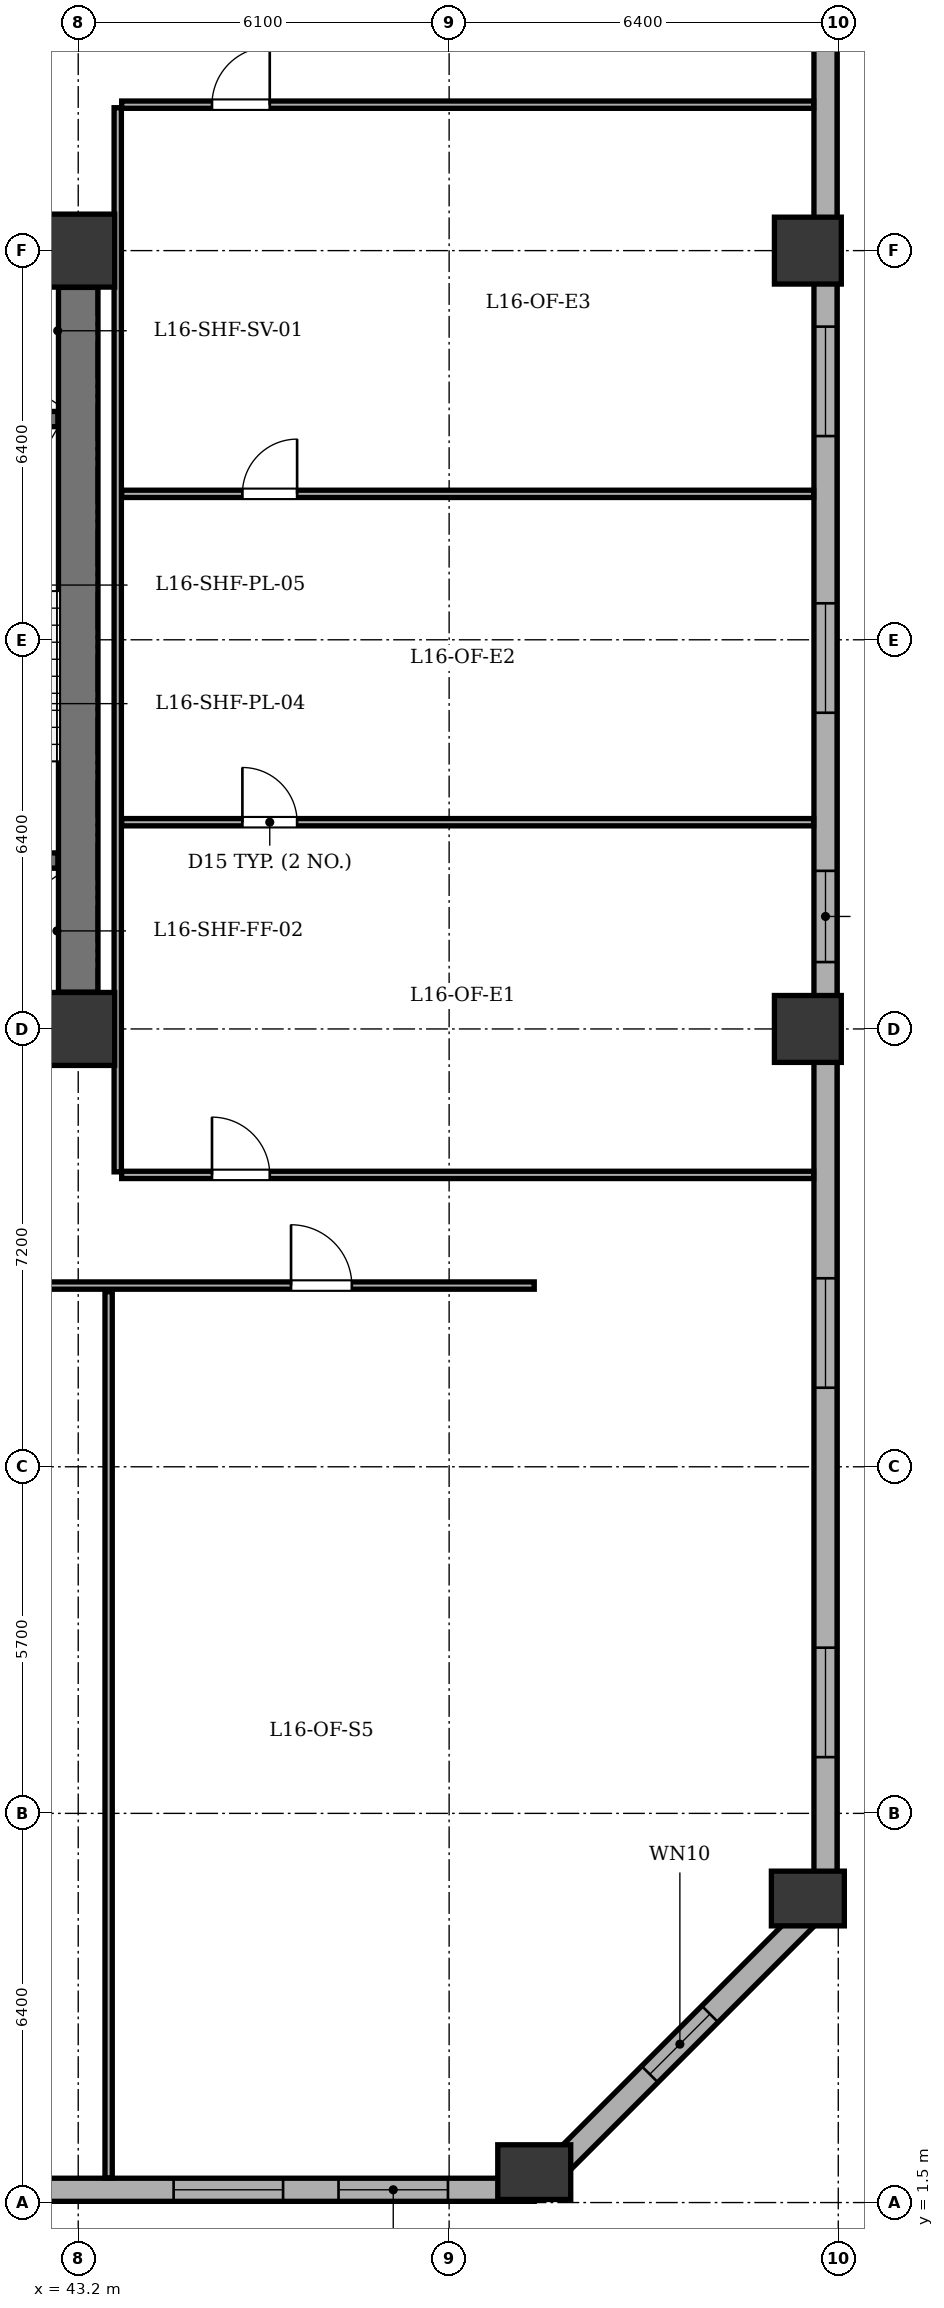
"""IFC4 building model, lengths in metres.
Left out: names, types, materials, properties, quantities, classifications, styles, units other than length and angle.
Written with IfcOpenShell. Run it as: python <this file> out.ifc"""

import sys

from ifc_helpers import new_model, si_unit, direction, frame, frame_2d, origin, origin_2d, place, context, subcontext, project, spatial, rectangle, extrude, element, fill, save


model = new_model("IFC4")
c1 = context("Model", 3, precision=1e-05, world=origin(), true_north=direction((0.0, 1.0)))
c2 = subcontext(c1, "Body", "Model", "MODEL_VIEW")
j1 = project(units=[si_unit("LENGTHUNIT", "METRE"), si_unit("PLANEANGLEUNIT", "RADIAN")], contexts=[c1])
p1 = place(None, origin())
s1 = spatial("IfcSite", under=j1, at=p1, CompositionType="ELEMENT")
p2 = place(p1, origin())
s2 = spatial("IfcBuilding", under=s1, at=p2, CompositionType="ELEMENT")
p3 = place(p2, frame((0.0, 0.0, 67.2)))
s3 = spatial("IfcBuildingStorey", under=s2, at=p3, CompositionType="ELEMENT", Elevation=67.2)
for number, where, z_axis, x_axis in (
    (1, (43.2, 20.8, 0.0), (0.0, 0.0, 1.0), (1.0, 0.0, 0.0)),
    (2, (43.2, 33.6, 0.0), (0.0, 0.0, 1.0), (1.0, 0.0, 0.0)),
):
    element("IfcColumn", number, at=place(p3, frame(where, z_axis=z_axis, x_axis=x_axis)), inside=s3, PredefinedType="COLUMN", context=c2, shape_type="SweptSolid", body=[
        extrude(rectangle(XDim=1.2, YDim=1.2, at=origin_2d()), origin(), (0.0, 0.0, 1.0), 3.9),
    ])
for number, where, z_axis, x_axis in (
    (3, (50.7, 2.0, 0.0), (0.0, 0.0, 1.0), (1.0, 0.0, 0.0)),
    (4, (55.2, 6.5, 0.0), (0.0, 0.0, 1.0), (1.0, 0.0, 0.0)),
):
    element("IfcColumn", number, at=place(p3, frame(where, z_axis=z_axis, x_axis=x_axis)), inside=s3, PredefinedType="COLUMN", context=c2, shape_type="SweptSolid", body=[
        extrude(rectangle(XDim=0.9, YDim=1.2, at=origin_2d()), origin(), (0.0, 0.0, 1.0), 3.9),
    ])
for number, where, z_axis, x_axis in (
    (5, (55.2, 20.8, 0.0), (0.0, 0.0, 1.0), (1.0, 0.0, 0.0)),
    (6, (55.2, 33.6, 0.0), (0.0, 0.0, 1.0), (1.0, 0.0, 0.0)),
):
    element("IfcColumn", number, at=place(p3, frame(where, z_axis=z_axis, x_axis=x_axis)), inside=s3, PredefinedType="COLUMN", context=c2, shape_type="SweptSolid", body=[
        extrude(rectangle(XDim=1.1, YDim=1.1, at=origin_2d()), origin(), (0.0, 0.0, 1.0), 3.9),
    ])
p4 = place(p3, frame((50.7, 1.71, 0.0), z_axis=(0.0, 0.0, 1.0), x_axis=(-1.0, 0.0, 0.0)))
e7 = element("IfcWall", 7, at=p4, inside=s3, PredefinedType="STANDARD", context=c2, shape_type="SweptSolid", body=[
    extrude(rectangle(XDim=35.0, YDim=0.38, at=frame_2d((17.5, 0.0))), origin(), (0.0, 0.0, 1.0), 2.835),
])
p5 = place(p4, frame((26.0, 0.0, 0.0)))
e8 = element("IfcOpeningElement", 8, at=p5, cuts=e7, PredefinedType="OPENING", context=c2, shape_type="SweptSolid", body=[
    extrude(rectangle(XDim=1.0, YDim=2.02, at=frame_2d((0.5, 1.01))), frame((0.0, 0.2, 0.0), z_axis=(0.0, -1.0, 0.0), x_axis=(1.0, 0.0, 0.0)), (0.0, 0.0, 1.0), 0.4),
])
p6 = place(p4, frame((1.419, 0.0, 0.8)))
e9 = element("IfcOpeningElement", 9, at=p6, cuts=e7, PredefinedType="OPENING", context=c2, shape_type="SweptSolid", body=[
    extrude(rectangle(XDim=1.8, YDim=1.9, at=frame_2d((0.9, 0.95))), frame((0.0, 0.2, 0.0), z_axis=(0.0, -1.0, 0.0), x_axis=(1.0, 0.0, 0.0)), (0.0, 0.0, 1.0), 0.4),
])
p7 = place(p4, frame((4.131, 0.0, 0.8)))
e10 = element("IfcOpeningElement", 10, at=p7, cuts=e7, PredefinedType="OPENING", context=c2, shape_type="SweptSolid", body=[
    extrude(rectangle(XDim=1.8, YDim=1.9, at=frame_2d((0.9, 0.95))), frame((0.0, 0.2, 0.0), z_axis=(0.0, -1.0, 0.0), x_axis=(1.0, 0.0, 0.0)), (0.0, 0.0, 1.0), 0.4),
])
p8 = place(p4, frame((8.16, 0.0, 0.8)))
e11 = element("IfcOpeningElement", 11, at=p8, cuts=e7, PredefinedType="OPENING", context=c2, shape_type="SweptSolid", body=[
    extrude(rectangle(XDim=1.8, YDim=1.9, at=frame_2d((0.9, 0.95))), frame((0.0, 0.2, 0.0), z_axis=(0.0, -1.0, 0.0), x_axis=(1.0, 0.0, 0.0)), (0.0, 0.0, 1.0), 0.4),
])
p9 = place(p4, frame((11.04, 0.0, 0.8)))
e12 = element("IfcOpeningElement", 12, at=p9, cuts=e7, PredefinedType="OPENING", context=c2, shape_type="SweptSolid", body=[
    extrude(rectangle(XDim=1.8, YDim=1.9, at=frame_2d((0.9, 0.95))), frame((0.0, 0.2, 0.0), z_axis=(0.0, -1.0, 0.0), x_axis=(1.0, 0.0, 0.0)), (0.0, 0.0, 1.0), 0.4),
])
p10 = place(p4, frame((17.675, 0.0, 0.8)))
e13 = element("IfcOpeningElement", 13, at=p10, cuts=e7, PredefinedType="OPENING", context=c2, shape_type="SweptSolid", body=[
    extrude(rectangle(XDim=1.8, YDim=1.9, at=frame_2d((0.9, 0.95))), frame((0.0, 0.2, 0.0), z_axis=(0.0, -1.0, 0.0), x_axis=(1.0, 0.0, 0.0)), (0.0, 0.0, 1.0), 0.4),
])
p11 = place(p4, frame((31.525, 0.0, 0.8)))
e14 = element("IfcOpeningElement", 14, at=p11, cuts=e7, PredefinedType="OPENING", context=c2, shape_type="SweptSolid", body=[
    extrude(rectangle(XDim=1.8, YDim=1.9, at=frame_2d((0.9, 0.95))), frame((0.0, 0.2, 0.0), z_axis=(0.0, -1.0, 0.0), x_axis=(1.0, 0.0, 0.0)), (0.0, 0.0, 1.0), 0.4),
])
p12 = place(p3, frame((55.49, 41.5, 0.0), z_axis=(0.0, 0.0, 1.0), x_axis=(0.0, -1.0, 0.0)))
e15 = element("IfcWall", 15, at=p12, inside=s3, PredefinedType="STANDARD", context=c2, shape_type="SweptSolid", body=[
    extrude(rectangle(XDim=35.0, YDim=0.38, at=frame_2d((17.5, 0.0))), origin(), (0.0, 0.0, 1.0), 2.835),
])
p13 = place(p12, frame((2.025, 0.0, 0.8)))
e16 = element("IfcOpeningElement", 16, at=p13, cuts=e15, PredefinedType="OPENING", context=c2, shape_type="SweptSolid", body=[
    extrude(rectangle(XDim=1.8, YDim=1.9, at=frame_2d((0.9, 0.95))), frame((0.0, 0.2, 0.0), z_axis=(0.0, -1.0, 0.0), x_axis=(1.0, 0.0, 0.0)), (0.0, 0.0, 1.0), 0.4),
])
p14 = place(p12, frame((9.15, 0.0, 0.8)))
e17 = element("IfcOpeningElement", 17, at=p14, cuts=e15, PredefinedType="OPENING", context=c2, shape_type="SweptSolid", body=[
    extrude(rectangle(XDim=1.8, YDim=1.9, at=frame_2d((0.9, 0.95))), frame((0.0, 0.2, 0.0), z_axis=(0.0, -1.0, 0.0), x_axis=(1.0, 0.0, 0.0)), (0.0, 0.0, 1.0), 0.4),
])
p15 = place(p12, frame((13.7, 0.0, 0.8)))
e18 = element("IfcOpeningElement", 18, at=p15, cuts=e15, PredefinedType="OPENING", context=c2, shape_type="SweptSolid", body=[
    extrude(rectangle(XDim=1.8, YDim=1.9, at=frame_2d((0.9, 0.95))), frame((0.0, 0.2, 0.0), z_axis=(0.0, -1.0, 0.0), x_axis=(1.0, 0.0, 0.0)), (0.0, 0.0, 1.0), 0.4),
])
p16 = place(p12, frame((18.1, 0.0, 0.8)))
e19 = element("IfcOpeningElement", 19, at=p16, cuts=e15, PredefinedType="OPENING", context=c2, shape_type="SweptSolid", body=[
    extrude(rectangle(XDim=1.5, YDim=1.9, at=frame_2d((0.75, 0.95))), frame((0.0, 0.2, 0.0), z_axis=(0.0, -1.0, 0.0), x_axis=(1.0, 0.0, 0.0)), (0.0, 0.0, 1.0), 0.4),
])
p17 = place(p12, frame((24.8, 0.0, 0.8)))
e20 = element("IfcOpeningElement", 20, at=p17, cuts=e15, PredefinedType="OPENING", context=c2, shape_type="SweptSolid", body=[
    extrude(rectangle(XDim=1.8, YDim=1.9, at=frame_2d((0.9, 0.95))), frame((0.0, 0.2, 0.0), z_axis=(0.0, -1.0, 0.0), x_axis=(1.0, 0.0, 0.0)), (0.0, 0.0, 1.0), 0.4),
])
p18 = place(p12, frame((30.875, 0.0, 0.8)))
e21 = element("IfcOpeningElement", 21, at=p18, cuts=e15, PredefinedType="OPENING", context=c2, shape_type="SweptSolid", body=[
    extrude(rectangle(XDim=1.8, YDim=1.9, at=frame_2d((0.9, 0.95))), frame((0.0, 0.2, 0.0), z_axis=(0.0, -1.0, 0.0), x_axis=(1.0, 0.0, 0.0)), (0.0, 0.0, 1.0), 0.4),
])
p19 = place(p3, frame((55.49, 6.5, 0.0), z_axis=(0.0, 0.0, 1.0), x_axis=(-0.707106781187, -0.707106781187, 0.0)))
e22 = element("IfcWall", 22, at=p19, inside=s3, PredefinedType="STANDARD", context=c2, shape_type="SweptSolid", body=[
    extrude(rectangle(XDim=6.774, YDim=0.38, at=frame_2d((3.387, 0.0))), origin(), (0.0, 0.0, 1.0), 2.835),
])
p20 = place(p19, frame((2.687, 0.0, 0.8)))
e23 = element("IfcOpeningElement", 23, at=p20, cuts=e22, PredefinedType="OPENING", context=c2, shape_type="SweptSolid", body=[
    extrude(rectangle(XDim=1.4, YDim=1.65, at=frame_2d((0.7, 0.825))), frame((0.0, 0.2, 0.0), z_axis=(0.0, -1.0, 0.0), x_axis=(1.0, 0.0, 0.0)), (0.0, 0.0, 1.0), 0.4),
])
p21 = place(p3, frame((43.2, 21.405, 0.0), z_axis=(0.0, 0.0, 1.0), x_axis=(0.0, 1.0, 0.0)))
e24 = element("IfcWall", 24, at=p21, inside=s3, PredefinedType="SHEAR", context=c2, shape_type="SweptSolid", body=[
    extrude(rectangle(XDim=11.59, YDim=0.65, at=frame_2d((5.795, 0.0))), origin(), (0.0, 0.0, 1.0), 3.45),
])
for number, where, z_axis, x_axis in (
    (25, (39.69, 23.57, 0.0), (0.0, 0.0, 1.0), (1.0, 0.0, 0.0)),
    (26, (39.69, 30.83, 0.0), (0.0, 0.0, 1.0), (1.0, 0.0, 0.0)),
):
    element("IfcWall", number, at=place(p3, frame(where, z_axis=z_axis, x_axis=x_axis)), inside=s3, PredefinedType="SHEAR", context=c2, shape_type="SweptSolid", body=[
        extrude(rectangle(XDim=3.175, YDim=0.25, at=frame_2d((1.587, 0.0))), origin(), (0.0, 0.0, 1.0), 3.45),
    ])
p22 = place(p3, frame((15.7, 16.58, 0.0), z_axis=(0.0, 0.0, 1.0), x_axis=(1.0, 0.0, 0.0)))
e27 = element("IfcWall", 27, at=p22, inside=s3, PredefinedType="PARTITIONING", context=c2, shape_type="SweptSolid", body=[
    extrude(rectangle(XDim=35.0, YDim=0.12, at=frame_2d((17.5, 0.0))), origin(), (0.0, 0.0, 1.0), 3.45),
])
p23 = place(p22, frame((2.825, 0.0, 0.0)))
e28 = element("IfcOpeningElement", 28, at=p23, cuts=e27, PredefinedType="OPENING", context=c2, shape_type="SweptSolid", body=[
    extrude(rectangle(XDim=1.0, YDim=2.1, at=frame_2d((0.5, 1.05))), frame((0.0, 0.07, 0.0), z_axis=(0.0, -1.0, 0.0), x_axis=(1.0, 0.0, 0.0)), (0.0, 0.0, 1.0), 0.14),
])
p24 = place(p22, frame((9.65, 0.0, 0.0)))
e29 = element("IfcOpeningElement", 29, at=p24, cuts=e27, PredefinedType="OPENING", context=c2, shape_type="SweptSolid", body=[
    extrude(rectangle(XDim=1.0, YDim=2.1, at=frame_2d((0.5, 1.05))), frame((0.0, 0.07, 0.0), z_axis=(0.0, -1.0, 0.0), x_axis=(1.0, 0.0, 0.0)), (0.0, 0.0, 1.0), 0.14),
])
p25 = place(p22, frame((16.825, 0.0, 0.0)))
e30 = element("IfcOpeningElement", 30, at=p25, cuts=e27, PredefinedType="OPENING", context=c2, shape_type="SweptSolid", body=[
    extrude(rectangle(XDim=1.0, YDim=2.1, at=frame_2d((0.5, 1.05))), frame((0.0, 0.07, 0.0), z_axis=(0.0, -1.0, 0.0), x_axis=(1.0, 0.0, 0.0)), (0.0, 0.0, 1.0), 0.14),
])
p26 = place(p22, frame((24.0, 0.0, 0.0)))
e31 = element("IfcOpeningElement", 31, at=p26, cuts=e27, PredefinedType="OPENING", context=c2, shape_type="SweptSolid", body=[
    extrude(rectangle(XDim=1.0, YDim=2.1, at=frame_2d((0.5, 1.05))), frame((0.0, 0.07, 0.0), z_axis=(0.0, -1.0, 0.0), x_axis=(1.0, 0.0, 0.0)), (0.0, 0.0, 1.0), 0.14),
])
p27 = place(p22, frame((31.0, 0.0, 0.0)))
e32 = element("IfcOpeningElement", 32, at=p27, cuts=e27, PredefinedType="OPENING", context=c2, shape_type="SweptSolid", body=[
    extrude(rectangle(XDim=1.0, YDim=2.1, at=frame_2d((0.5, 1.05))), frame((0.0, 0.07, 0.0), z_axis=(0.0, -1.0, 0.0), x_axis=(1.0, 0.0, 0.0)), (0.0, 0.0, 1.0), 0.14),
])
p28 = place(p3, frame((43.7, 1.905, 0.0), z_axis=(0.0, 0.0, 1.0), x_axis=(0.0, 1.0, 0.0)))
e33 = element("IfcWall", 33, at=p28, inside=s3, PredefinedType="PARTITIONING", context=c2, shape_type="SweptSolid", body=[
    extrude(rectangle(XDim=14.575, YDim=0.12, at=frame_2d((7.288, 0.0))), origin(), (0.0, 0.0, 1.0), 3.45),
])
p29 = place(p3, frame((43.85, 18.45, 0.0), z_axis=(0.0, 0.0, 1.0), x_axis=(0.0, 1.0, 0.0)))
e34 = element("IfcWall", 34, at=p29, inside=s3, PredefinedType="PARTITIONING", context=c2, shape_type="SweptSolid", body=[
    extrude(rectangle(XDim=17.5, YDim=0.12, at=frame_2d((8.75, 0.0))), origin(), (0.0, 0.0, 1.0), 3.45),
])
p30 = place(p3, frame((43.915, 18.4, 0.0), z_axis=(0.0, 0.0, 1.0), x_axis=(1.0, 0.0, 0.0)))
e35 = element("IfcWall", 35, at=p30, inside=s3, PredefinedType="PARTITIONING", context=c2, shape_type="SweptSolid", body=[
    extrude(rectangle(XDim=11.38, YDim=0.12, at=frame_2d((5.69, 0.0))), origin(), (0.0, 0.0, 1.0), 3.45),
])
p31 = place(p30, frame((1.485, 0.0, 0.0)))
e36 = element("IfcOpeningElement", 36, at=p31, cuts=e35, PredefinedType="OPENING", context=c2, shape_type="SweptSolid", body=[
    extrude(rectangle(XDim=0.95, YDim=2.1, at=frame_2d((0.475, 1.05))), frame((0.0, 0.07, 0.0), z_axis=(0.0, -1.0, 0.0), x_axis=(1.0, 0.0, 0.0)), (0.0, 0.0, 1.0), 0.14),
])
p32 = place(p3, frame((43.915, 36.0, 0.0), z_axis=(0.0, 0.0, 1.0), x_axis=(1.0, 0.0, 0.0)))
e37 = element("IfcWall", 37, at=p32, inside=s3, PredefinedType="PARTITIONING", context=c2, shape_type="SweptSolid", body=[
    extrude(rectangle(XDim=11.38, YDim=0.12, at=frame_2d((5.69, 0.0))), origin(), (0.0, 0.0, 1.0), 3.45),
])
p33 = place(p32, frame((1.485, 0.0, 0.0)))
e38 = element("IfcOpeningElement", 38, at=p33, cuts=e37, PredefinedType="OPENING", context=c2, shape_type="SweptSolid", body=[
    extrude(rectangle(XDim=0.95, YDim=2.1, at=frame_2d((0.475, 1.05))), frame((0.0, 0.07, 0.0), z_axis=(0.0, -1.0, 0.0), x_axis=(1.0, 0.0, 0.0)), (0.0, 0.0, 1.0), 0.14),
])
p34 = place(p3, frame((43.915, 24.2, 0.0), z_axis=(0.0, 0.0, 1.0), x_axis=(1.0, 0.0, 0.0)))
e39 = element("IfcWall", 39, at=p34, inside=s3, PredefinedType="PARTITIONING", context=c2, shape_type="SweptSolid", body=[
    extrude(rectangle(XDim=11.38, YDim=0.12, at=frame_2d((5.69, 0.0))), origin(), (0.0, 0.0, 1.0), 3.45),
])
p35 = place(p34, frame((1.985, 0.0, 0.0)))
e40 = element("IfcOpeningElement", 40, at=p35, cuts=e39, PredefinedType="OPENING", context=c2, shape_type="SweptSolid", body=[
    extrude(rectangle(XDim=0.9, YDim=2.05, at=frame_2d((0.45, 1.025))), frame((0.0, 0.07, 0.0), z_axis=(0.0, -1.0, 0.0), x_axis=(1.0, 0.0, 0.0)), (0.0, 0.0, 1.0), 0.14),
])
p36 = place(p3, frame((43.915, 29.6, 0.0), z_axis=(0.0, 0.0, 1.0), x_axis=(1.0, 0.0, 0.0)))
e41 = element("IfcWall", 41, at=p36, inside=s3, PredefinedType="PARTITIONING", context=c2, shape_type="SweptSolid", body=[
    extrude(rectangle(XDim=11.38, YDim=0.12, at=frame_2d((5.69, 0.0))), origin(), (0.0, 0.0, 1.0), 2.885),
])
p37 = place(p36, frame((1.985, 0.0, 0.0)))
e42 = element("IfcOpeningElement", 42, at=p37, cuts=e41, PredefinedType="OPENING", context=c2, shape_type="SweptSolid", body=[
    extrude(rectangle(XDim=0.9, YDim=2.05, at=frame_2d((0.45, 1.025))), frame((0.0, 0.07, 0.0), z_axis=(0.0, -1.0, 0.0), x_axis=(1.0, 0.0, 0.0)), (0.0, 0.0, 1.0), 0.14),
])
p38 = place(p6, origin())
e43 = element("IfcWindow", 43, at=p38, inside=s3, PartitioningType="SINGLE_PANEL", PredefinedType="WINDOW", context=c2, shape_type="SweptSolid", body=[
    extrude(rectangle(XDim=1.8, YDim=1.9, at=frame_2d((0.9, 0.95))), frame((0.0, -0.01, 0.0), z_axis=(0.0, -1.0, 0.0), x_axis=(1.0, 0.0, 0.0)), (0.0, 0.0, 1.0), 0.06),
])
fill(e9, e43)
p39 = place(p7, origin())
e44 = element("IfcWindow", 44, at=p39, inside=s3, PartitioningType="SINGLE_PANEL", PredefinedType="WINDOW", context=c2, shape_type="SweptSolid", body=[
    extrude(rectangle(XDim=1.8, YDim=1.9, at=frame_2d((0.9, 0.95))), frame((0.0, -0.01, 0.0), z_axis=(0.0, -1.0, 0.0), x_axis=(1.0, 0.0, 0.0)), (0.0, 0.0, 1.0), 0.06),
])
fill(e10, e44)
p40 = place(p14, origin())
e45 = element("IfcWindow", 45, at=p40, inside=s3, PartitioningType="SINGLE_PANEL", PredefinedType="WINDOW", context=c2, shape_type="SweptSolid", body=[
    extrude(rectangle(XDim=1.8, YDim=1.9, at=frame_2d((0.9, 0.95))), frame((0.0, -0.01, 0.0), z_axis=(0.0, -1.0, 0.0), x_axis=(1.0, 0.0, 0.0)), (0.0, 0.0, 1.0), 0.06),
])
fill(e17, e45)
p41 = place(p15, origin())
e46 = element("IfcWindow", 46, at=p41, inside=s3, PartitioningType="SINGLE_PANEL", PredefinedType="WINDOW", context=c2, shape_type="SweptSolid", body=[
    extrude(rectangle(XDim=1.8, YDim=1.9, at=frame_2d((0.9, 0.95))), frame((0.0, -0.01, 0.0), z_axis=(0.0, -1.0, 0.0), x_axis=(1.0, 0.0, 0.0)), (0.0, 0.0, 1.0), 0.06),
])
fill(e18, e46)
p42 = place(p16, origin())
e47 = element("IfcWindow", 47, at=p42, inside=s3, PartitioningType="SINGLE_PANEL", PredefinedType="WINDOW", context=c2, shape_type="SweptSolid", body=[
    extrude(rectangle(XDim=1.5, YDim=1.9, at=frame_2d((0.75, 0.95))), frame((0.0, -0.01, 0.0), z_axis=(0.0, -1.0, 0.0), x_axis=(1.0, 0.0, 0.0)), (0.0, 0.0, 1.0), 0.06),
])
fill(e19, e47)
p43 = place(p17, origin())
e48 = element("IfcWindow", 48, at=p43, inside=s3, PartitioningType="SINGLE_PANEL", PredefinedType="WINDOW", context=c2, shape_type="SweptSolid", body=[
    extrude(rectangle(XDim=1.8, YDim=1.9, at=frame_2d((0.9, 0.95))), frame((0.0, -0.01, 0.0), z_axis=(0.0, -1.0, 0.0), x_axis=(1.0, 0.0, 0.0)), (0.0, 0.0, 1.0), 0.06),
])
fill(e20, e48)
p44 = place(p18, origin())
e49 = element("IfcWindow", 49, at=p44, inside=s3, PartitioningType="SINGLE_PANEL", PredefinedType="WINDOW", context=c2, shape_type="SweptSolid", body=[
    extrude(rectangle(XDim=1.8, YDim=1.9, at=frame_2d((0.9, 0.95))), frame((0.0, -0.01, 0.0), z_axis=(0.0, -1.0, 0.0), x_axis=(1.0, 0.0, 0.0)), (0.0, 0.0, 1.0), 0.06),
])
fill(e21, e49)
p45 = place(p20, origin())
e50 = element("IfcWindow", 50, at=p45, inside=s3, PartitioningType="SINGLE_PANEL", PredefinedType="WINDOW", context=c2, shape_type="SweptSolid", body=[
    extrude(rectangle(XDim=1.4, YDim=1.65, at=frame_2d((0.7, 0.825))), frame((0.0, -0.01, 0.0), z_axis=(0.0, -1.0, 0.0), x_axis=(1.0, 0.0, 0.0)), (0.0, 0.0, 1.0), 0.06),
])
fill(e23, e50)
p46 = place(p27, origin())
e51 = element("IfcDoor", 51, at=p46, inside=s3, OperationType="SINGLE_SWING_LEFT", PredefinedType="DOOR", context=c2, shape_type="SweptSolid", body=[
    extrude(rectangle(XDim=1.0, YDim=2.1, at=frame_2d((0.5, 1.05))), frame((0.0, 0.025, 0.0), z_axis=(0.0, -1.0, 0.0), x_axis=(1.0, 0.0, 0.0)), (0.0, 0.0, 1.0), 0.05),
])
fill(e32, e51)
p47 = place(p35, origin())
e52 = element("IfcDoor", 52, at=p47, inside=s3, OperationType="SINGLE_SWING_LEFT", PredefinedType="DOOR", context=c2, shape_type="SweptSolid", body=[
    extrude(rectangle(XDim=0.9, YDim=2.05, at=frame_2d((0.45, 1.025))), frame((0.0, 0.025, 0.0), z_axis=(0.0, -1.0, 0.0), x_axis=(1.0, 0.0, 0.0)), (0.0, 0.0, 1.0), 0.05),
])
fill(e40, e52)
p48 = place(p37, origin())
e53 = element("IfcDoor", 53, at=p48, inside=s3, OperationType="SINGLE_SWING_RIGHT", PredefinedType="DOOR", context=c2, shape_type="SweptSolid", body=[
    extrude(rectangle(XDim=0.9, YDim=2.05, at=frame_2d((0.45, 1.025))), frame((0.0, 0.025, 0.0), z_axis=(0.0, -1.0, 0.0), x_axis=(1.0, 0.0, 0.0)), (0.0, 0.0, 1.0), 0.05),
])
fill(e42, e53)
p49 = place(p31, origin())
e54 = element("IfcDoor", 54, at=p49, inside=s3, OperationType="SINGLE_SWING_LEFT", PredefinedType="DOOR", context=c2, shape_type="SweptSolid", body=[
    extrude(rectangle(XDim=0.95, YDim=2.1, at=frame_2d((0.475, 1.05))), frame((0.0, 0.025, 0.0), z_axis=(0.0, -1.0, 0.0), x_axis=(1.0, 0.0, 0.0)), (0.0, 0.0, 1.0), 0.05),
])
fill(e36, e54)
p50 = place(p33, origin())
e55 = element("IfcDoor", 55, at=p50, inside=s3, OperationType="SINGLE_SWING_RIGHT", PredefinedType="DOOR", context=c2, shape_type="SweptSolid", body=[
    extrude(rectangle(XDim=0.95, YDim=2.1, at=frame_2d((0.475, 1.05))), frame((0.0, 0.025, 0.0), z_axis=(0.0, -1.0, 0.0), x_axis=(1.0, 0.0, 0.0)), (0.0, 0.0, 1.0), 0.05),
])
fill(e38, e55)
save(model, sys.argv[1])
